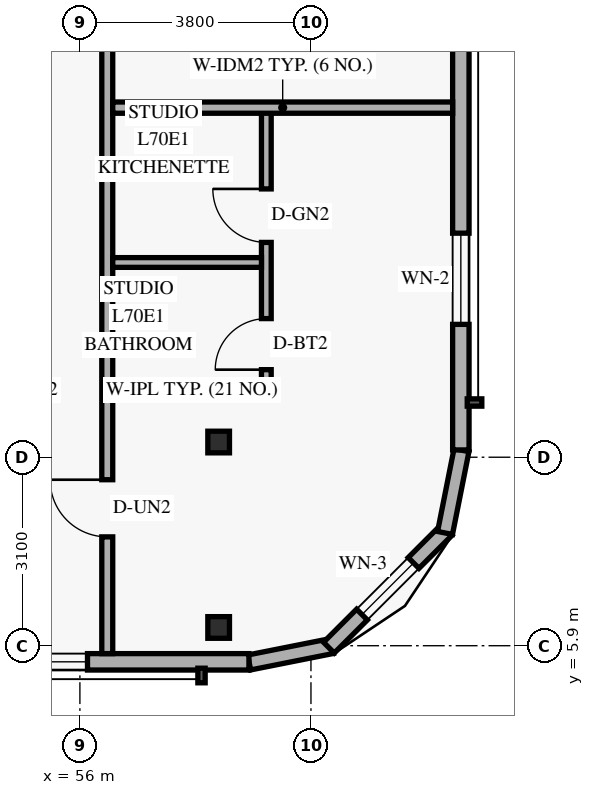
"""IFC4 building model, lengths in metres.
Left out: names, types, materials, properties, quantities, classifications, styles, units other than length and angle.
Written with IfcOpenShell. Run it as: python <this file> out.ifc"""

import sys

from ifc_helpers import new_model, si_unit, direction, frame, frame_2d, origin, origin_2d, place, context, subcontext, project, spatial, rectangle, hollow_rectangle, extrude, element, fill, save


model = new_model("IFC4")
c1 = context("Model", 3, precision=1e-05, world=origin(), true_north=direction((0.0, 1.0)))
c2 = subcontext(c1, "Body", "Model", "MODEL_VIEW")
j1 = project(units=[si_unit("LENGTHUNIT", "METRE"), si_unit("PLANEANGLEUNIT", "RADIAN")], contexts=[c1])
p1 = place(None, origin())
s1 = spatial("IfcSite", under=j1, at=p1, CompositionType="ELEMENT")
p2 = place(p1, origin())
s2 = spatial("IfcBuilding", under=s1, at=p2, CompositionType="ELEMENT")
p3 = place(p2, frame((0.0, 0.0, 267.6)))
s3 = spatial("IfcBuildingStorey", under=s2, at=p3, CompositionType="ELEMENT", Elevation=267.6)
for number, where, z_axis, x_axis in (
    (1, (58.177, 6.2, 0.0), (0.058, 0.0, 0.998), (0.0, 1.0, 0.0)),
    (2, (58.177, 9.25, 0.0), (0.058, 0.0, 0.998), (0.0, 1.0, 0.0)),
):
    element("IfcColumn", number, at=place(p3, frame(where, z_axis=z_axis, x_axis=x_axis)), inside=s3, PredefinedType="COLUMN", context=c2, shape_type="SweptSolid", body=[
        extrude(hollow_rectangle(XDim=0.356, YDim=0.356, WallThickness=0.016, at=origin_2d()), origin(), (0.0, 0.0, 1.0), 3.606),
    ])
p4 = place(p3, frame((58.783, 5.624, 0.0), z_axis=(0.0, 0.0, 1.0), x_axis=(0.980809899341, 0.19496651342, 0.0)))
e3 = element("IfcWall", 3, at=p4, inside=s3, PredefinedType="SOLIDWALL", context=c2, shape_type="SweptSolid", body=[
    extrude(rectangle(XDim=1.389, YDim=0.25, at=frame_2d((0.694, 0.0))), origin(), (0.0, 0.0, 1.0), 3.36),
])
p5 = place(p3, frame((60.095, 5.868, 0.0), z_axis=(0.0, 0.0, 1.0), x_axis=(0.707106781187, 0.707106781187, 0.0)))
e4 = element("IfcWall", 4, at=p5, inside=s3, PredefinedType="SOLIDWALL", context=c2, shape_type="SweptSolid", body=[
    extrude(rectangle(XDim=2.739, YDim=0.25, at=frame_2d((1.37, 0.0))), origin(), (0.0, 0.0, 1.0), 3.36),
])
p6 = place(p5, frame((0.77, 0.0, 0.85)))
e5 = element("IfcOpeningElement", 5, at=p6, cuts=e4, PredefinedType="OPENING", context=c2, shape_type="SweptSolid", body=[
    extrude(rectangle(XDim=1.2, YDim=1.5, at=frame_2d((0.6, 0.75))), frame((0.0, 0.135, 0.0), z_axis=(0.0, -1.0, 0.0), x_axis=(1.0, 0.0, 0.0)), (0.0, 0.0, 1.0), 0.27),
])
p7 = place(p3, frame((62.005, 7.754, 0.0), z_axis=(0.0, 0.0, 1.0), x_axis=(0.195135625965, 0.9807762678, 0.0)))
e6 = element("IfcWall", 6, at=p7, inside=s3, PredefinedType="SOLIDWALL", context=c2, shape_type="SweptSolid", body=[
    extrude(rectangle(XDim=1.389, YDim=0.25, at=frame_2d((0.694, 0.0))), origin(), (0.0, 0.0, 1.0), 3.36),
])
p8 = place(p3, frame((25.82, 5.635, 0.0), z_axis=(0.0, 0.0, 1.0), x_axis=(1.0, 0.0, 0.0)))
e7 = element("IfcWall", 7, at=p8, inside=s3, PredefinedType="SOLIDWALL", context=c2, shape_type="SweptSolid", body=[
    extrude(rectangle(XDim=32.96, YDim=0.27, at=frame_2d((16.48, 0.0))), origin(), (0.0, 0.0, 1.0), 3.36),
])
p9 = place(p8, frame((14.438, 0.0, 0.85)))
e8 = element("IfcOpeningElement", 8, at=p9, cuts=e7, PredefinedType="OPENING", context=c2, shape_type="SweptSolid", body=[
    extrude(rectangle(XDim=1.2, YDim=1.5, at=frame_2d((0.6, 0.75))), frame((0.0, 0.145, 0.0), z_axis=(0.0, -1.0, 0.0), x_axis=(1.0, 0.0, 0.0)), (0.0, 0.0, 1.0), 0.29),
])
p10 = place(p8, frame((25.782, 0.0, 0.85)))
e9 = element("IfcOpeningElement", 9, at=p10, cuts=e7, PredefinedType="OPENING", context=c2, shape_type="SweptSolid", body=[
    extrude(rectangle(XDim=1.2, YDim=1.5, at=frame_2d((0.6, 0.75))), frame((0.0, 0.145, 0.0), z_axis=(0.0, -1.0, 0.0), x_axis=(1.0, 0.0, 0.0)), (0.0, 0.0, 1.0), 0.29),
])
p11 = place(p8, frame((29.105, 0.0, 0.85)))
e10 = element("IfcOpeningElement", 10, at=p11, cuts=e7, PredefinedType="OPENING", context=c2, shape_type="SweptSolid", body=[
    extrude(rectangle(XDim=1.2, YDim=1.5, at=frame_2d((0.6, 0.75))), frame((0.0, 0.145, 0.0), z_axis=(0.0, -1.0, 0.0), x_axis=(1.0, 0.0, 0.0)), (0.0, 0.0, 1.0), 0.29),
])
p12 = place(p3, frame((62.265, 9.12, 0.0), z_axis=(0.0, 0.0, 1.0), x_axis=(0.0, 1.0, 0.0)))
e11 = element("IfcWall", 11, at=p12, inside=s3, PredefinedType="SOLIDWALL", context=c2, shape_type="SweptSolid", body=[
    extrude(rectangle(XDim=9.28, YDim=0.27, at=frame_2d((4.64, 0.0))), origin(), (0.0, 0.0, 1.0), 3.36),
])
p13 = place(p12, frame((2.065, 0.0, 0.85)))
e12 = element("IfcOpeningElement", 12, at=p13, cuts=e11, PredefinedType="OPENING", context=c2, shape_type="SweptSolid", body=[
    extrude(rectangle(XDim=1.5, YDim=1.55, at=frame_2d((0.75, 0.775))), frame((0.0, 0.145, 0.0), z_axis=(0.0, -1.0, 0.0), x_axis=(1.0, 0.0, 0.0)), (0.0, 0.0, 1.0), 0.29),
])
p14 = place(p12, frame((6.705, 0.0, 0.85)))
e13 = element("IfcOpeningElement", 13, at=p14, cuts=e11, PredefinedType="OPENING", context=c2, shape_type="SweptSolid", body=[
    extrude(rectangle(XDim=1.5, YDim=1.55, at=frame_2d((0.75, 0.775))), frame((0.0, 0.145, 0.0), z_axis=(0.0, -1.0, 0.0), x_axis=(1.0, 0.0, 0.0)), (0.0, 0.0, 1.0), 0.29),
])
p15 = place(p3, frame((56.45, 5.77, 0.0), z_axis=(0.0, 0.0, 1.0), x_axis=(0.0, 1.0, 0.0)))
e14 = element("IfcWall", 14, at=p15, inside=s3, PredefinedType="STANDARD", context=c2, shape_type="SweptSolid", body=[
    extrude(rectangle(XDim=36.46, YDim=0.18, at=frame_2d((18.23, 0.0))), origin(), (0.0, 0.0, 1.0), 2.803),
])
p16 = place(p15, frame((1.92, 0.0, 0.0)))
e15 = element("IfcOpeningElement", 15, at=p16, cuts=e14, PredefinedType="OPENING", context=c2, shape_type="SweptSolid", body=[
    extrude(rectangle(XDim=0.94, YDim=2.15, at=frame_2d((0.47, 1.075))), frame((0.0, 0.1, 0.0), z_axis=(0.0, -1.0, 0.0), x_axis=(1.0, 0.0, 0.0)), (0.0, 0.0, 1.0), 0.2),
])
p17 = place(p15, frame((13.03, 0.0, 0.0)))
e16 = element("IfcOpeningElement", 16, at=p17, cuts=e14, PredefinedType="OPENING", context=c2, shape_type="SweptSolid", body=[
    extrude(rectangle(XDim=0.94, YDim=2.15, at=frame_2d((0.47, 1.075))), frame((0.0, 0.1, 0.0), z_axis=(0.0, -1.0, 0.0), x_axis=(1.0, 0.0, 0.0)), (0.0, 0.0, 1.0), 0.2),
])
p18 = place(p15, frame((24.99, 0.0, 0.0)))
e17 = element("IfcOpeningElement", 17, at=p18, cuts=e14, PredefinedType="OPENING", context=c2, shape_type="SweptSolid", body=[
    extrude(rectangle(XDim=0.94, YDim=2.15, at=frame_2d((0.47, 1.075))), frame((0.0, 0.1, 0.0), z_axis=(0.0, -1.0, 0.0), x_axis=(1.0, 0.0, 0.0)), (0.0, 0.0, 1.0), 0.2),
])
p19 = place(p15, frame((33.52, 0.0, 0.0)))
e18 = element("IfcOpeningElement", 18, at=p19, cuts=e14, PredefinedType="OPENING", context=c2, shape_type="SweptSolid", body=[
    extrude(rectangle(XDim=0.94, YDim=2.15, at=frame_2d((0.47, 1.075))), frame((0.0, 0.1, 0.0), z_axis=(0.0, -1.0, 0.0), x_axis=(1.0, 0.0, 0.0)), (0.0, 0.0, 1.0), 0.2),
])
p20 = place(p3, frame((56.54, 10.11, 0.0), z_axis=(0.0, 0.0, 1.0), x_axis=(1.0, 0.0, 0.0)))
e19 = element("IfcWall", 19, at=p20, inside=s3, PredefinedType="PLUMBINGWALL", context=c2, shape_type="SweptSolid", body=[
    extrude(rectangle(XDim=2.606, YDim=0.16, at=frame_2d((1.303, 0.0))), origin(), (0.0, 0.0, 1.0), 2.879),
])
p21 = place(p3, frame((59.066, 10.02, 0.0), z_axis=(0.0, 0.0, 1.0), x_axis=(0.0, 1.0, 0.0)))
e20 = element("IfcWall", 20, at=p21, inside=s3, PredefinedType="PLUMBINGWALL", context=c2, shape_type="SweptSolid", body=[
    extrude(rectangle(XDim=4.73, YDim=0.16, at=frame_2d((2.365, 0.0))), origin(), (0.0, 0.0, 1.0), 3.36),
])
p22 = place(p21, frame((0.42, 0.0, 0.0)))
e21 = element("IfcOpeningElement", 21, at=p22, cuts=e20, PredefinedType="OPENING", context=c2, shape_type="SweptSolid", body=[
    extrude(rectangle(XDim=0.84, YDim=2.12, at=frame_2d((0.42, 1.06))), frame((0.0, 0.09, 0.0), z_axis=(0.0, -1.0, 0.0), x_axis=(1.0, 0.0, 0.0)), (0.0, 0.0, 1.0), 0.18),
])
p23 = place(p21, frame((2.513, 0.0, 0.0)))
e22 = element("IfcOpeningElement", 22, at=p23, cuts=e20, PredefinedType="OPENING", context=c2, shape_type="SweptSolid", body=[
    extrude(rectangle(XDim=0.88, YDim=2.12, at=frame_2d((0.44, 1.06))), frame((0.0, 0.09, 0.0), z_axis=(0.0, -1.0, 0.0), x_axis=(1.0, 0.0, 0.0)), (0.0, 0.0, 1.0), 0.18),
])
p24 = place(p3, frame((56.54, 12.203, 0.0), z_axis=(0.0, 0.0, 1.0), x_axis=(1.0, 0.0, 0.0)))
e23 = element("IfcWall", 23, at=p24, inside=s3, PredefinedType="PLUMBINGWALL", context=c2, shape_type="SweptSolid", body=[
    extrude(rectangle(XDim=2.446, YDim=0.16, at=frame_2d((1.223, 0.0))), origin(), (0.0, 0.0, 1.0), 2.879),
])
p25 = place(p3, frame((56.54, 14.75, 0.0), z_axis=(0.0, 0.0, 1.0), x_axis=(1.0, 0.0, 0.0)))
e24 = element("IfcWall", 24, at=p25, inside=s3, PredefinedType="PARTITIONING", context=c2, shape_type="SweptSolid", body=[
    extrude(rectangle(XDim=5.59, YDim=0.185, at=frame_2d((2.795, 0.0))), origin(), (0.0, 0.0, 1.0), 2.879),
])
p26 = place(p6, origin())
e25 = element("IfcWindow", 25, at=p26, inside=s3, PartitioningType="SINGLE_PANEL", PredefinedType="WINDOW", context=c2, shape_type="SweptSolid", body=[
    extrude(rectangle(XDim=1.2, YDim=1.5, at=frame_2d((0.6, 0.75))), frame((0.0, 0.03, 0.0), z_axis=(0.0, -1.0, 0.0), x_axis=(1.0, 0.0, 0.0)), (0.0, 0.0, 1.0), 0.06),
])
fill(e5, e25)
p27 = place(p11, origin())
e26 = element("IfcWindow", 26, at=p27, inside=s3, PartitioningType="SINGLE_PANEL", PredefinedType="WINDOW", context=c2, shape_type="SweptSolid", body=[
    extrude(rectangle(XDim=1.2, YDim=1.5, at=frame_2d((0.6, 0.75))), frame((0.0, 0.03, 0.0), z_axis=(0.0, -1.0, 0.0), x_axis=(1.0, 0.0, 0.0)), (0.0, 0.0, 1.0), 0.06),
])
fill(e10, e26)
p28 = place(p13, origin())
e27 = element("IfcWindow", 27, at=p28, inside=s3, PartitioningType="SINGLE_PANEL", PredefinedType="WINDOW", context=c2, shape_type="SweptSolid", body=[
    extrude(rectangle(XDim=1.5, YDim=1.55, at=frame_2d((0.75, 0.775))), frame((0.0, 0.03, 0.0), z_axis=(0.0, -1.0, 0.0), x_axis=(1.0, 0.0, 0.0)), (0.0, 0.0, 1.0), 0.06),
])
fill(e12, e27)
p29 = place(p16, origin())
e28 = element("IfcDoor", 28, at=p29, inside=s3, OperationType="SINGLE_SWING_RIGHT", PredefinedType="DOOR", context=c2, shape_type="SweptSolid", body=[
    extrude(rectangle(XDim=0.94, YDim=2.15, at=frame_2d((0.47, 1.075))), frame((0.0, 0.025, 0.0), z_axis=(0.0, -1.0, 0.0), x_axis=(1.0, 0.0, 0.0)), (0.0, 0.0, 1.0), 0.05),
])
fill(e15, e28)
p30 = place(p22, origin())
e29 = element("IfcDoor", 29, at=p30, inside=s3, OperationType="SINGLE_SWING_LEFT", PredefinedType="DOOR", context=c2, shape_type="SweptSolid", body=[
    extrude(rectangle(XDim=0.84, YDim=2.12, at=frame_2d((0.42, 1.06))), frame((0.0, 0.025, 0.0), z_axis=(0.0, -1.0, 0.0), x_axis=(1.0, 0.0, 0.0)), (0.0, 0.0, 1.0), 0.05),
])
fill(e21, e29)
p31 = place(p23, origin())
e30 = element("IfcDoor", 30, at=p31, inside=s3, OperationType="SINGLE_SWING_RIGHT", PredefinedType="DOOR", context=c2, shape_type="SweptSolid", body=[
    extrude(rectangle(XDim=0.88, YDim=2.12, at=frame_2d((0.44, 1.06))), frame((0.0, 0.025, 0.0), z_axis=(0.0, -1.0, 0.0), x_axis=(1.0, 0.0, 0.0)), (0.0, 0.0, 1.0), 0.05),
])
fill(e22, e30)
save(model, sys.argv[1])
